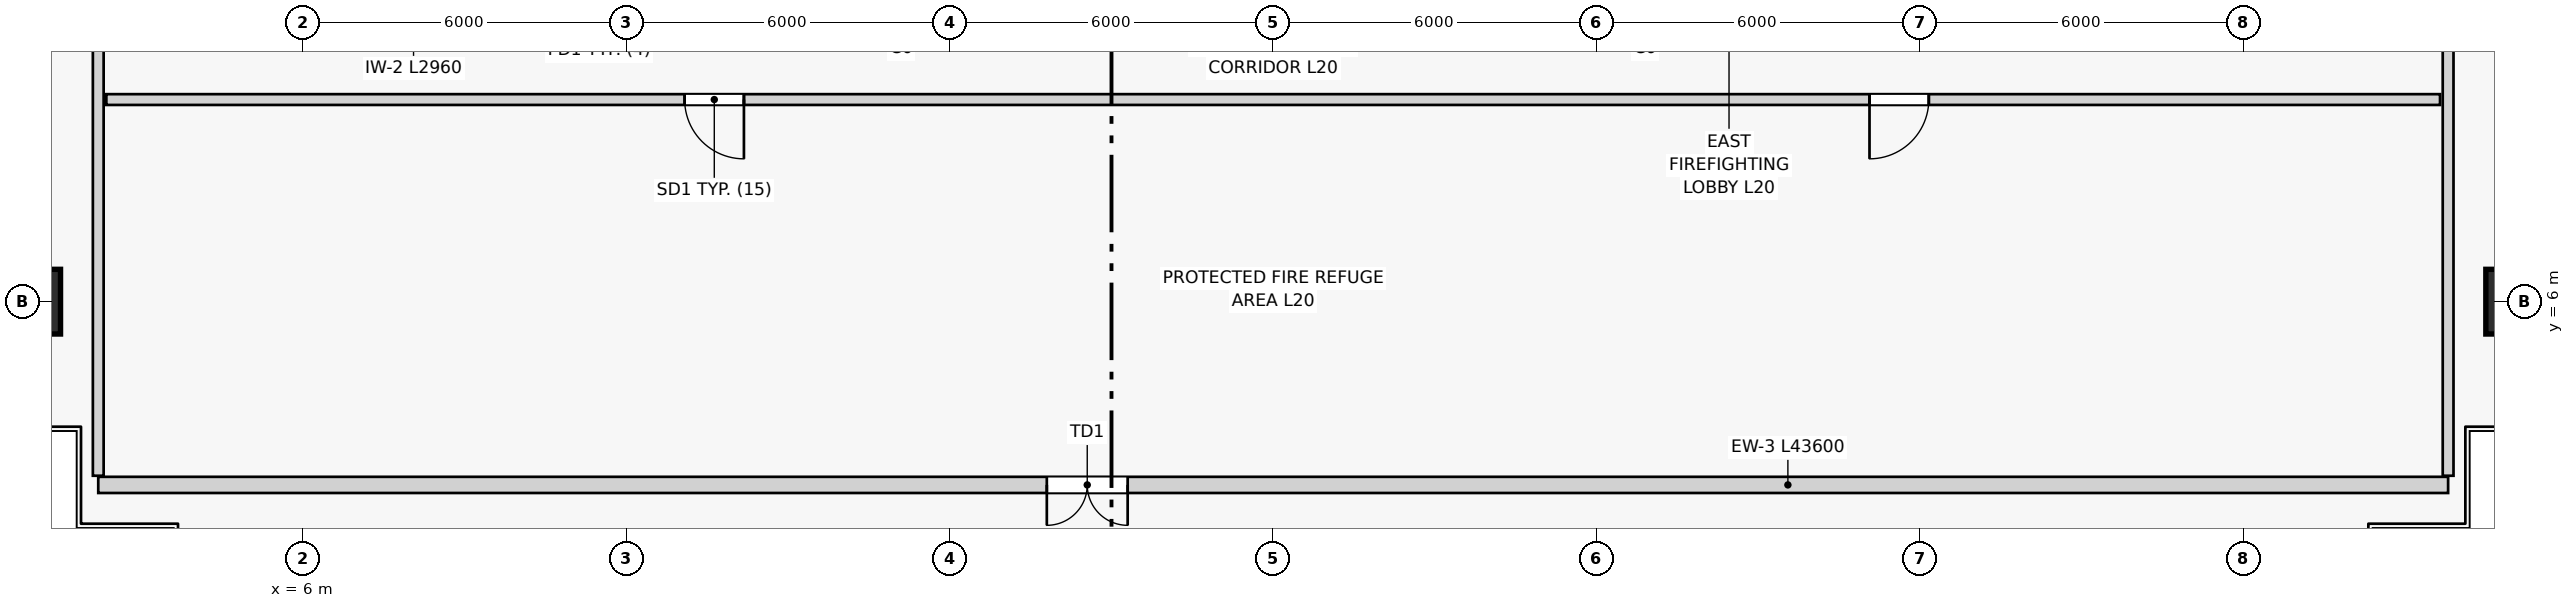
"""IFC4 building model, lengths in metres.
Left out: names, types, materials, properties, quantities, classifications, styles, units other than length and angle.
Written with IfcOpenShell. Run it as: python <this file> out.ifc"""

import sys

from ifc_helpers import new_model, si_unit, direction, frame, frame_2d, origin, origin_2d, place, context, subcontext, project, spatial, rectangle, extrude, source, transform, mapped, element, fill, save


model = new_model("IFC4")
c1 = context("Model", 3, precision=1e-05, world=origin(), true_north=direction((0.0, 1.0)))
c2 = subcontext(c1, "Body", "Model", "MODEL_VIEW")
j1 = project(units=[si_unit("LENGTHUNIT", "METRE"), si_unit("PLANEANGLEUNIT", "RADIAN")], contexts=[c1])
p1 = place(None, origin())
s1 = spatial("IfcSite", under=j1, at=p1, CompositionType="ELEMENT")
p2 = place(p1, origin())
s2 = spatial("IfcBuilding", under=s1, at=p2, CompositionType="ELEMENT")
p3 = place(p2, frame((0.0, 0.0, 76.5)))
s3 = spatial("IfcBuildingStorey", under=s2, at=p3, CompositionType="ELEMENT", Elevation=76.5)
m1 = source(origin(), c2, "Body", "SweptSolid", [
    extrude(rectangle(XDim=1.2, YDim=1.2, at=origin_2d()), origin(), (0.0, 0.0, 1.0), 7.2),
])
for number, where, z_axis, x_axis in (
    (1, (0.9, 6.0, 0.0), (0.0, 0.0, 1.0), (1.0, 0.0, 0.0)),
    (2, (47.1, 6.0, 0.0), (0.0, 0.0, 1.0), (1.0, 0.0, 0.0)),
):
    element("IfcColumn", number, at=place(p3, frame(where, z_axis=z_axis, x_axis=x_axis)), inside=s3, PredefinedType="COLUMN", context=c2, shape_type="MappedRepresentation", body=[
        mapped(m1, transform((0.0, 0.0, 0.0), scale=1.0)),
    ])
p4 = place(p3, frame((2.2, 2.6, 0.0), z_axis=(0.0, 0.0, 1.0), x_axis=(1.0, 0.0, 0.0)))
e3 = element("IfcWall", 3, at=p4, inside=s3, PredefinedType="SOLIDWALL", context=c2, shape_type="SweptSolid", body=[
    extrude(rectangle(XDim=43.6, YDim=0.3, at=frame_2d((21.8, 0.0))), origin(), (0.0, 0.0, 1.0), 6.55),
])
p5 = place(p4, frame((17.6, 0.0, 0.0)))
e4 = element("IfcOpeningElement", 4, at=p5, cuts=e3, PredefinedType="OPENING", context=c2, shape_type="SweptSolid", body=[
    extrude(rectangle(XDim=1.5, YDim=2.3, at=frame_2d((0.75, 1.15))), frame((0.0, 0.16, 0.0), z_axis=(0.0, -1.0, 0.0), x_axis=(1.0, 0.0, 0.0)), (0.0, 0.0, 1.0), 0.32),
])
for number, where, z_axis, x_axis in (
    (5, (2.2, 2.77, 0.0), (0.0, 0.0, 1.0), (0.0, 1.0, 0.0)),
    (6, (45.8, 2.77, 0.0), (0.0, 0.0, 1.0), (0.0, 1.0, 0.0)),
):
    element("IfcWall", number, at=place(p3, frame(where, z_axis=z_axis, x_axis=x_axis)), inside=s3, PredefinedType="PARTITIONING", context=c2, shape_type="SweptSolid", body=[
        extrude(rectangle(XDim=8.48, YDim=0.2, at=frame_2d((4.24, 0.0))), origin(), (0.0, 0.0, 1.0), 6.55),
    ])
p6 = place(p3, frame((2.35, 9.75, 0.0), z_axis=(0.0, 0.0, 1.0), x_axis=(1.0, 0.0, 0.0)))
e7 = element("IfcWall", 7, at=p6, inside=s3, PredefinedType="PARTITIONING", context=c2, shape_type="SweptSolid", body=[
    extrude(rectangle(XDim=43.3, YDim=0.2, at=frame_2d((21.65, 0.0))), origin(), (0.0, 0.0, 1.0), 6.55),
])
p7 = place(p6, frame((10.73, 0.0, 0.0)))
e8 = element("IfcOpeningElement", 8, at=p7, cuts=e7, PredefinedType="OPENING", context=c2, shape_type="SweptSolid", body=[
    extrude(rectangle(XDim=1.1, YDim=2.2, at=frame_2d((0.55, 1.1))), frame((0.0, 0.11, 0.0), z_axis=(0.0, -1.0, 0.0), x_axis=(1.0, 0.0, 0.0)), (0.0, 0.0, 1.0), 0.22),
])
p8 = place(p6, frame((32.714, 0.0, 0.0)))
e9 = element("IfcOpeningElement", 9, at=p8, cuts=e7, PredefinedType="OPENING", context=c2, shape_type="SweptSolid", body=[
    extrude(rectangle(XDim=1.1, YDim=2.2, at=frame_2d((0.55, 1.1))), frame((0.0, 0.11, 0.0), z_axis=(0.0, -1.0, 0.0), x_axis=(1.0, 0.0, 0.0)), (0.0, 0.0, 1.0), 0.22),
])
m2 = source(origin(), c2, "Body", "SweptSolid", [
    extrude(rectangle(XDim=1.5, YDim=2.3, at=frame_2d((0.75, 1.15))), frame((0.0, 0.025, 0.0), z_axis=(0.0, -1.0, 0.0), x_axis=(1.0, 0.0, 0.0)), (0.0, 0.0, 1.0), 0.05),
])
p9 = place(p5, frame((1.5, 0.0, 0.0), z_axis=(0.0, 0.0, 1.0), x_axis=(-1.0, 0.0, 0.0)))
e10 = element("IfcDoor", 10, at=p9, inside=s3, OperationType="DOUBLE_DOOR_SINGLE_SWING", PredefinedType="DOOR", context=c2, shape_type="MappedRepresentation", body=[
    mapped(m2, transform((0.0, 0.0, 0.0), scale=1.0)),
])
fill(e4, e10)
m3 = source(origin(), c2, "Body", "SweptSolid", [
    extrude(rectangle(XDim=1.1, YDim=2.2, at=frame_2d((0.55, 1.1))), frame((0.0, 0.025, 0.0), z_axis=(0.0, -1.0, 0.0), x_axis=(1.0, 0.0, 0.0)), (0.0, 0.0, 1.0), 0.05),
])
p10 = place(p7, frame((1.1, 0.0, 0.0), z_axis=(0.0, 0.0, 1.0), x_axis=(-1.0, 0.0, 0.0)))
e11 = element("IfcDoor", 11, at=p10, inside=s3, OperationType="SINGLE_SWING_LEFT", PredefinedType="DOOR", context=c2, shape_type="MappedRepresentation", body=[
    mapped(m3, transform((0.0, 0.0, 0.0), scale=1.0)),
])
fill(e8, e11)
p11 = place(p8, frame((1.1, 0.0, 0.0), z_axis=(0.0, 0.0, 1.0), x_axis=(-1.0, 0.0, 0.0)))
e12 = element("IfcDoor", 12, at=p11, inside=s3, OperationType="SINGLE_SWING_RIGHT", PredefinedType="DOOR", context=c2, shape_type="MappedRepresentation", body=[
    mapped(m3, transform((0.0, 0.0, 0.0), scale=1.0)),
])
fill(e9, e12)
save(model, sys.argv[1])
